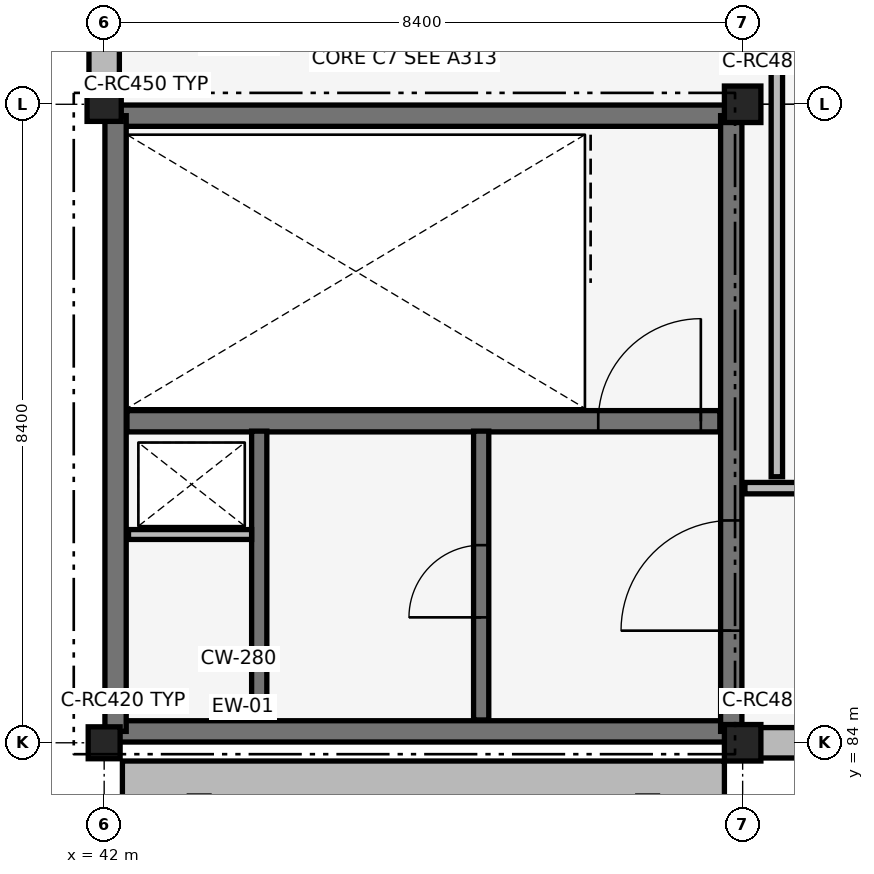
"""IFC4 building model, lengths in metres.
Left out: names, types, materials, properties, quantities, classifications, styles, units other than length and angle.
Written with IfcOpenShell. Run it as: python <this file> out.ifc"""

import sys

from ifc_helpers import new_model, si_unit, direction, frame, frame_2d, origin, origin_2d, place, context, subcontext, project, spatial, rectangle, extrude, element, fill, save


model = new_model("IFC4")
c1 = context("Model", 3, precision=1e-05, world=origin(), true_north=direction((0.0, 1.0)))
c2 = subcontext(c1, "Body", "Model", "MODEL_VIEW")
j1 = project(units=[si_unit("LENGTHUNIT", "METRE"), si_unit("PLANEANGLEUNIT", "RADIAN")], contexts=[c1])
p1 = place(None, origin())
s1 = spatial("IfcSite", under=j1, at=p1, CompositionType="ELEMENT")
p2 = place(p1, origin())
s2 = spatial("IfcBuilding", under=s1, at=p2, CompositionType="ELEMENT")
p3 = place(p2, frame((0.0, 0.0, 9.86)))
s3 = spatial("IfcBuildingStorey", under=s2, at=p3, CompositionType="ELEMENT", Elevation=9.86)
for number, where, z_axis, x_axis in (
    (1, (42.15, 84.15, 0.0), (0.0, 0.0, 1.0), (1.0, 0.0, 0.0)),
    (2, (42.15, 92.25, 0.0), (0.0, 0.0, 1.0), (1.0, 0.0, 0.0)),
    (3, (42.15, 84.15, 0.0), (0.0, 0.0, 1.0), (0.0, 1.0, 0.0)),
):
    element("IfcWall", number, at=place(p3, frame(where, z_axis=z_axis, x_axis=x_axis)), inside=s3, PredefinedType="SHEAR", context=c2, shape_type="SweptSolid", body=[
        extrude(rectangle(XDim=8.1, YDim=0.28, at=frame_2d((4.05, 0.0))), origin(), (0.0, 0.0, 1.0), 3.78),
    ])
p4 = place(p3, frame((50.25, 84.15, 0.0), z_axis=(0.0, 0.0, 1.0), x_axis=(0.0, 1.0, 0.0)))
e4 = element("IfcWall", 4, at=p4, inside=s3, PredefinedType="SHEAR", context=c2, shape_type="SweptSolid", body=[
    extrude(rectangle(XDim=8.1, YDim=0.28, at=frame_2d((4.05, 0.0))), origin(), (0.0, 0.0, 1.0), 3.78),
])
p5 = place(p4, frame((1.325, 0.0, 0.0)))
e5 = element("IfcOpeningElement", 5, at=p5, cuts=e4, PredefinedType="OPENING", context=c2, shape_type="SweptSolid", body=[
    extrude(rectangle(XDim=1.45, YDim=2.15, at=frame_2d((0.725, 1.075))), frame((0.0, 0.15, 0.0), z_axis=(0.0, -1.0, 0.0), x_axis=(1.0, 0.0, 0.0)), (0.0, 0.0, 1.0), 0.3),
])
p6 = place(p3, frame((42.3, 88.23, 0.0), z_axis=(0.0, 0.0, 1.0), x_axis=(1.0, 0.0, 0.0)))
e6 = element("IfcWall", 6, at=p6, inside=s3, PredefinedType="SHEAR", context=c2, shape_type="SweptSolid", body=[
    extrude(rectangle(XDim=7.8, YDim=0.28, at=frame_2d((3.9, 0.0))), origin(), (0.0, 0.0, 1.0), 3.78),
])
p7 = place(p6, frame((6.2, 0.0, 0.0)))
e7 = element("IfcOpeningElement", 7, at=p7, cuts=e6, PredefinedType="OPENING", context=c2, shape_type="SweptSolid", body=[
    extrude(rectangle(XDim=1.35, YDim=2.15, at=frame_2d((0.675, 1.075))), frame((0.0, 0.15, 0.0), z_axis=(0.0, -1.0, 0.0), x_axis=(1.0, 0.0, 0.0)), (0.0, 0.0, 1.0), 0.3),
])
p8 = place(p3, frame((42.0, 84.0, 0.0), z_axis=(0.0, 0.0, 1.0), x_axis=(1.0, 0.0, 0.0)))
e8 = element("IfcColumn", 8, at=p8, inside=s3, PredefinedType="COLUMN", context=c2, shape_type="SweptSolid", body=[
    extrude(rectangle(XDim=0.42, YDim=0.42, at=origin_2d()), origin(), (0.0, 0.0, 1.0), 3.78),
])
p9 = place(p3, frame((42.0, 92.4, 0.0), z_axis=(0.0, 0.0, 1.0), x_axis=(1.0, 0.0, 0.0)))
e9 = element("IfcColumn", 9, at=p9, inside=s3, PredefinedType="COLUMN", context=c2, shape_type="SweptSolid", body=[
    extrude(rectangle(XDim=0.45, YDim=0.45, at=origin_2d()), origin(), (0.0, 0.0, 1.0), 3.78),
])
for number, where, z_axis, x_axis in (
    (10, (50.4, 84.0, 0.0), (0.0, 0.0, 1.0), (1.0, 0.0, 0.0)),
    (11, (50.4, 92.4, 0.0), (0.0, 0.0, 1.0), (1.0, 0.0, 0.0)),
):
    element("IfcColumn", number, at=place(p3, frame(where, z_axis=z_axis, x_axis=x_axis)), inside=s3, PredefinedType="COLUMN", context=c2, shape_type="SweptSolid", body=[
        extrude(rectangle(XDim=0.48, YDim=0.48, at=origin_2d()), origin(), (0.0, 0.0, 1.0), 3.78),
    ])
p10 = place(p3, frame((42.24, 83.52, 0.0), z_axis=(0.0, 0.0, 1.0), x_axis=(1.0, 0.0, 0.0)))
e12 = element("IfcWall", 12, at=p10, inside=s3, PredefinedType="SOLIDWALL", context=c2, shape_type="SweptSolid", body=[
    extrude(rectangle(XDim=7.92, YDim=0.48, at=frame_2d((3.96, 0.0))), origin(), (0.0, 0.0, 1.0), 4.08),
])
p11 = place(p3, frame((42.0, 92.61, 0.0), z_axis=(0.0, 0.0, 1.0), x_axis=(0.0, 1.0, 0.0)))
e13 = element("IfcWall", 13, at=p11, inside=s3, PredefinedType="SOLIDWALL", context=c2, shape_type="SweptSolid", body=[
    extrude(rectangle(XDim=7.995, YDim=0.4, at=frame_2d((3.998, 0.0))), origin(), (0.0, 0.0, 1.0), 3.78),
])
p12 = place(p11, frame((1.044, 0.0, 0.75)))
e14 = element("IfcOpeningElement", 14, at=p12, cuts=e13, PredefinedType="OPENING", context=c2, shape_type="SweptSolid", body=[
    extrude(rectangle(XDim=0.95, YDim=2.8, at=frame_2d((0.475, 1.4))), frame((0.0, 0.21, 0.0), z_axis=(0.0, -1.0, 0.0), x_axis=(1.0, 0.0, 0.0)), (0.0, 0.0, 1.0), 0.42),
])
p13 = place(p11, frame((2.643, 0.0, 0.75)))
e15 = element("IfcOpeningElement", 15, at=p13, cuts=e13, PredefinedType="OPENING", context=c2, shape_type="SweptSolid", body=[
    extrude(rectangle(XDim=0.95, YDim=2.8, at=frame_2d((0.475, 1.4))), frame((0.0, 0.21, 0.0), z_axis=(0.0, -1.0, 0.0), x_axis=(1.0, 0.0, 0.0)), (0.0, 0.0, 1.0), 0.42),
])
p14 = place(p11, frame((4.402, 0.0, 0.75)))
e16 = element("IfcOpeningElement", 16, at=p14, cuts=e13, PredefinedType="OPENING", context=c2, shape_type="SweptSolid", body=[
    extrude(rectangle(XDim=0.95, YDim=2.8, at=frame_2d((0.475, 1.4))), frame((0.0, 0.21, 0.0), z_axis=(0.0, -1.0, 0.0), x_axis=(1.0, 0.0, 0.0)), (0.0, 0.0, 1.0), 0.42),
])
p15 = place(p11, frame((6.001, 0.0, 0.75)))
e17 = element("IfcOpeningElement", 17, at=p15, cuts=e13, PredefinedType="OPENING", context=c2, shape_type="SweptSolid", body=[
    extrude(rectangle(XDim=0.95, YDim=2.8, at=frame_2d((0.475, 1.4))), frame((0.0, 0.21, 0.0), z_axis=(0.0, -1.0, 0.0), x_axis=(1.0, 0.0, 0.0)), (0.0, 0.0, 1.0), 0.42),
])
p16 = place(p3, frame((50.625, 84.0, 0.0), z_axis=(0.0, 0.0, 1.0), x_axis=(1.0, 0.0, 0.0)))
e18 = element("IfcWall", 18, at=p16, inside=s3, PredefinedType="SOLIDWALL", context=c2, shape_type="SweptSolid", body=[
    extrude(rectangle(XDim=7.98, YDim=0.4, at=frame_2d((3.99, 0.0))), origin(), (0.0, 0.0, 1.0), 3.78),
])
p17 = place(p3, frame((46.96, 84.3, 0.0), z_axis=(0.0, 0.0, 1.0), x_axis=(0.0, 1.0, 0.0)))
e19 = element("IfcWall", 19, at=p17, inside=s3, PredefinedType="SHEAR", context=c2, shape_type="SweptSolid", body=[
    extrude(rectangle(XDim=3.8, YDim=0.2, at=frame_2d((1.9, 0.0))), origin(), (0.0, 0.0, 1.0), 3.78),
])
p18 = place(p17, frame((1.35, 0.0, 0.0)))
e20 = element("IfcOpeningElement", 20, at=p18, cuts=e19, PredefinedType="OPENING", context=c2, shape_type="SweptSolid", body=[
    extrude(rectangle(XDim=0.95, YDim=2.1, at=frame_2d((0.475, 1.05))), frame((0.0, 0.11, 0.0), z_axis=(0.0, -1.0, 0.0), x_axis=(1.0, 0.0, 0.0)), (0.0, 0.0, 1.0), 0.22),
])
p19 = place(p3, frame((44.04, 84.3, 0.0), z_axis=(0.0, 0.0, 1.0), x_axis=(0.0, 1.0, 0.0)))
e21 = element("IfcWall", 21, at=p19, inside=s3, PredefinedType="SHEAR", context=c2, shape_type="SweptSolid", body=[
    extrude(rectangle(XDim=3.8, YDim=0.2, at=frame_2d((1.9, 0.0))), origin(), (0.0, 0.0, 1.0), 3.78),
])
p20 = place(p3, frame((42.32, 86.74, 0.0), z_axis=(0.0, 0.0, 1.0), x_axis=(1.0, 0.0, 0.0)))
e22 = element("IfcWall", 22, at=p20, inside=s3, PredefinedType="PARTITIONING", context=c2, shape_type="SweptSolid", body=[
    extrude(rectangle(XDim=1.62, YDim=0.13, at=frame_2d((0.81, 0.0))), origin(), (0.0, 0.0, 1.0), 3.78),
])
p21 = place(p3, frame((50.43, 87.35, 0.0), z_axis=(0.0, 0.0, 1.0), x_axis=(1.0, 0.0, 0.0)))
e23 = element("IfcWall", 23, at=p21, inside=s3, PredefinedType="PARTITIONING", context=c2, shape_type="SweptSolid", body=[
    extrude(rectangle(XDim=24.57, YDim=0.15, at=frame_2d((12.285, 0.0))), origin(), (0.0, 0.0, 1.0), 3.78),
])
p22 = place(p21, frame((11.76, 0.0, 0.0)))
e24 = element("IfcOpeningElement", 24, at=p22, cuts=e23, PredefinedType="OPENING", context=c2, shape_type="SweptSolid", body=[
    extrude(rectangle(XDim=1.05, YDim=2.15, at=frame_2d((0.525, 1.075))), frame((0.0, 0.085, 0.0), z_axis=(0.0, -1.0, 0.0), x_axis=(1.0, 0.0, 0.0)), (0.0, 0.0, 1.0), 0.17),
])
p23 = place(p3, frame((50.85, 87.5, 0.0), z_axis=(0.0, 0.0, 1.0), x_axis=(0.0, 1.0, 0.0)))
e25 = element("IfcWall", 25, at=p23, inside=s3, PredefinedType="PARTITIONING", context=c2, shape_type="SweptSolid", body=[
    extrude(rectangle(XDim=29.92, YDim=0.15, at=frame_2d((14.96, 0.0))), origin(), (0.0, 0.0, 1.0), 3.78),
])
p24 = place(p7, origin())
e26 = element("IfcDoor", 26, at=p24, inside=s3, OperationType="SINGLE_SWING_RIGHT", PredefinedType="DOOR", context=c2, shape_type="SweptSolid", body=[
    extrude(rectangle(XDim=1.35, YDim=2.15, at=frame_2d((0.675, 1.075))), frame((0.0, 0.025, 0.0), z_axis=(0.0, -1.0, 0.0), x_axis=(1.0, 0.0, 0.0)), (0.0, 0.0, 1.0), 0.05),
])
fill(e7, e26)
p25 = place(p18, origin())
e27 = element("IfcDoor", 27, at=p25, inside=s3, OperationType="SINGLE_SWING_LEFT", PredefinedType="DOOR", context=c2, shape_type="SweptSolid", body=[
    extrude(rectangle(XDim=0.95, YDim=2.1, at=frame_2d((0.475, 1.05))), frame((0.0, 0.025, 0.0), z_axis=(0.0, -1.0, 0.0), x_axis=(1.0, 0.0, 0.0)), (0.0, 0.0, 1.0), 0.05),
])
fill(e20, e27)
p26 = place(p5, origin())
e28 = element("IfcDoor", 28, at=p26, inside=s3, OperationType="DOUBLE_DOOR_SINGLE_SWING", PredefinedType="DOOR", context=c2, shape_type="SweptSolid", body=[
    extrude(rectangle(XDim=1.45, YDim=2.15, at=frame_2d((0.725, 1.075))), frame((0.0, 0.025, 0.0), z_axis=(0.0, -1.0, 0.0), x_axis=(1.0, 0.0, 0.0)), (0.0, 0.0, 1.0), 0.05),
])
fill(e5, e28)
save(model, sys.argv[1])
